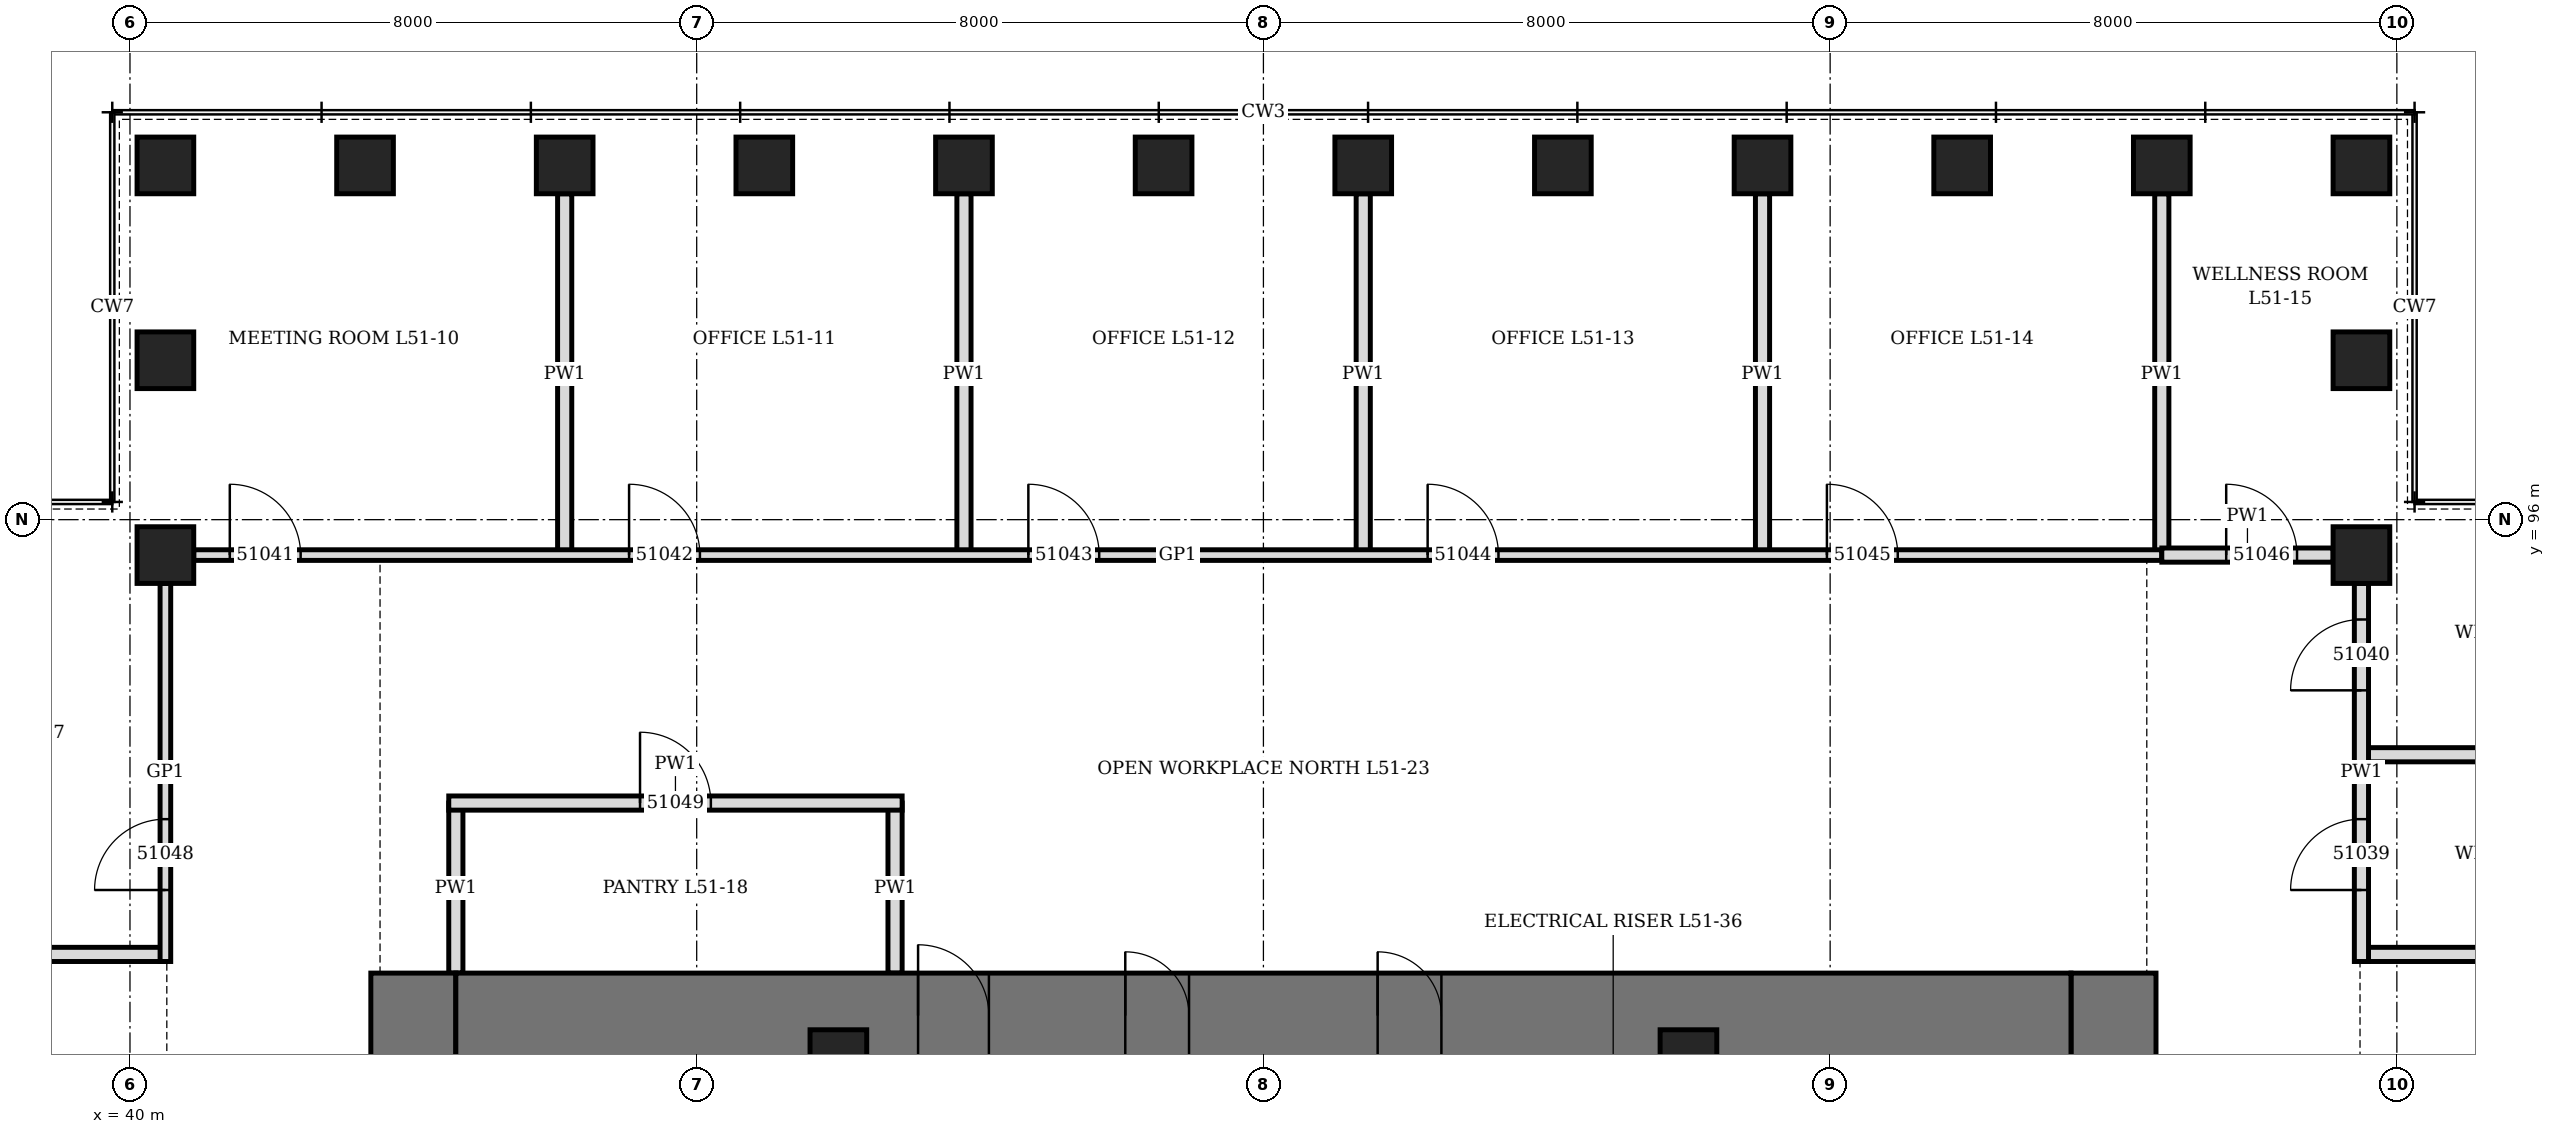
"""IFC4 building model, lengths in metres.
Left out: names, types, materials, properties, quantities, classifications, styles, units other than length and angle.
Written with IfcOpenShell. Run it as: python <this file> out.ifc"""

import sys

from ifc_helpers import new_model, si_unit, direction, frame, frame_2d, origin, origin_2d, place, context, subcontext, project, spatial, rectangle, hollow_rectangle, extrude, element, fill, save


model = new_model("IFC4")
c1 = context("Model", 3, precision=1e-05, world=origin(), true_north=direction((0.0, 1.0)))
c2 = subcontext(c1, "Body", "Model", "MODEL_VIEW")
j1 = project(units=[si_unit("LENGTHUNIT", "METRE"), si_unit("PLANEANGLEUNIT", "RADIAN")], contexts=[c1])
p1 = place(None, origin())
s1 = spatial("IfcSite", under=j1, at=p1, CompositionType="ELEMENT")
p2 = place(p1, origin())
s2 = spatial("IfcBuilding", under=s1, at=p2, CompositionType="ELEMENT")
p3 = place(p2, frame((0.0, 0.0, 227.5)))
s3 = spatial("IfcBuildingStorey", under=s2, at=p3, CompositionType="ELEMENT", Elevation=227.5)
for number, where, z_axis, x_axis in (
    (1, (71.5, 95.5, 0.0), (0.0, 0.0, 1.0), (0.0, 1.0, 0.0)),
    (2, (71.5, 98.25, 0.0), (0.0, 0.0, 1.0), (0.0, 1.0, 0.0)),
    (3, (71.5, 101.0, 0.0), (0.0, 0.0, 1.0), (1.0, 0.0, 0.0)),
    (4, (68.682, 101.0, 0.0), (0.0, 0.0, 1.0), (1.0, 0.0, 0.0)),
    (5, (65.864, 101.0, 0.0), (0.0, 0.0, 1.0), (1.0, 0.0, 0.0)),
    (6, (63.045, 101.0, 0.0), (0.0, 0.0, 1.0), (1.0, 0.0, 0.0)),
    (7, (60.227, 101.0, 0.0), (0.0, 0.0, 1.0), (1.0, 0.0, 0.0)),
    (8, (57.409, 101.0, 0.0), (0.0, 0.0, 1.0), (1.0, 0.0, 0.0)),
    (9, (54.591, 101.0, 0.0), (0.0, 0.0, 1.0), (1.0, 0.0, 0.0)),
    (10, (51.773, 101.0, 0.0), (0.0, 0.0, 1.0), (1.0, 0.0, 0.0)),
    (11, (48.955, 101.0, 0.0), (0.0, 0.0, 1.0), (1.0, 0.0, 0.0)),
    (12, (46.136, 101.0, 0.0), (0.0, 0.0, 1.0), (1.0, 0.0, 0.0)),
    (13, (43.318, 101.0, 0.0), (0.0, 0.0, 1.0), (1.0, 0.0, 0.0)),
    (14, (40.5, 101.0, 0.0), (0.0, 0.0, 1.0), (0.0, 1.0, 0.0)),
    (15, (40.5, 98.25, 0.0), (0.0, 0.0, 1.0), (0.0, 1.0, 0.0)),
    (16, (40.5, 95.5, 0.0), (0.0, 0.0, 1.0), (1.0, 0.0, 0.0)),
):
    element("IfcColumn", number, at=place(p3, frame(where, z_axis=z_axis, x_axis=x_axis)), inside=s3, PredefinedType="COLUMN", context=c2, shape_type="SweptSolid", body=[
        extrude(hollow_rectangle(XDim=0.8, YDim=0.8, WallThickness=0.08, at=origin_2d()), origin(), (0.0, 0.0, 1.0), 4.2),
    ])
p4 = place(p3, frame((44.0, 70.4, 0.0), z_axis=(0.0, 0.0, 1.0), x_axis=(0.0, 1.0, 0.0)))
e17 = element("IfcWall", 17, at=p4, inside=s3, PredefinedType="SHEAR", context=c2, shape_type="SweptSolid", body=[
    extrude(rectangle(XDim=19.2, YDim=1.2, at=frame_2d((9.6, 0.0))), origin(), (0.0, 0.0, 1.0), 4.2),
])
p5 = place(p4, frame((8.6, 0.0, 0.0)))
e18 = element("IfcOpeningElement", 18, at=p5, cuts=e17, PredefinedType="OPENING", context=c2, shape_type="SweptSolid", body=[
    extrude(rectangle(XDim=2.0, YDim=2.4, at=frame_2d((1.0, 1.2))), frame((0.0, 0.61, 0.0), z_axis=(0.0, -1.0, 0.0), x_axis=(1.0, 0.0, 0.0)), (0.0, 0.0, 1.0), 1.22),
])
p6 = place(p3, frame((68.0, 70.4, 0.0), z_axis=(0.0, 0.0, 1.0), x_axis=(0.0, 1.0, 0.0)))
e19 = element("IfcWall", 19, at=p6, inside=s3, PredefinedType="SHEAR", context=c2, shape_type="SweptSolid", body=[
    extrude(rectangle(XDim=19.2, YDim=1.2, at=frame_2d((9.6, 0.0))), origin(), (0.0, 0.0, 1.0), 4.2),
])
p7 = place(p6, frame((8.6, 0.0, 0.0)))
e20 = element("IfcOpeningElement", 20, at=p7, cuts=e19, PredefinedType="OPENING", context=c2, shape_type="SweptSolid", body=[
    extrude(rectangle(XDim=2.0, YDim=2.4, at=frame_2d((1.0, 1.2))), frame((0.0, 0.61, 0.0), z_axis=(0.0, -1.0, 0.0), x_axis=(1.0, 0.0, 0.0)), (0.0, 0.0, 1.0), 1.22),
])
p8 = place(p3, frame((44.6, 89.0, 0.0), z_axis=(0.0, 0.0, 1.0), x_axis=(1.0, 0.0, 0.0)))
e21 = element("IfcWall", 21, at=p8, inside=s3, PredefinedType="SHEAR", context=c2, shape_type="SweptSolid", body=[
    extrude(rectangle(XDim=22.8, YDim=1.2, at=frame_2d((11.4, 0.0))), origin(), (0.0, 0.0, 1.0), 4.2),
])
p9 = place(p8, frame((6.525, 0.0, 0.0)))
e22 = element("IfcOpeningElement", 22, at=p9, cuts=e21, PredefinedType="OPENING", context=c2, shape_type="SweptSolid", body=[
    extrude(rectangle(XDim=1.0, YDim=2.1, at=frame_2d((0.5, 1.05))), frame((0.0, 0.61, 0.0), z_axis=(0.0, -1.0, 0.0), x_axis=(1.0, 0.0, 0.0)), (0.0, 0.0, 1.0), 1.22),
])
p10 = place(p8, frame((9.45, 0.0, 0.0)))
e23 = element("IfcOpeningElement", 23, at=p10, cuts=e21, PredefinedType="OPENING", context=c2, shape_type="SweptSolid", body=[
    extrude(rectangle(XDim=0.9, YDim=2.1, at=frame_2d((0.45, 1.05))), frame((0.0, 0.61, 0.0), z_axis=(0.0, -1.0, 0.0), x_axis=(1.0, 0.0, 0.0)), (0.0, 0.0, 1.0), 1.22),
])
p11 = place(p8, frame((13.012, 0.0, 0.0)))
e24 = element("IfcOpeningElement", 24, at=p11, cuts=e21, PredefinedType="OPENING", context=c2, shape_type="SweptSolid", body=[
    extrude(rectangle(XDim=0.9, YDim=2.1, at=frame_2d((0.45, 1.05))), frame((0.0, 0.61, 0.0), z_axis=(0.0, -1.0, 0.0), x_axis=(1.0, 0.0, 0.0)), (0.0, 0.0, 1.0), 1.22),
])
for number, where, z_axis, x_axis in (
    (25, (50.0, 88.4, 0.0), (0.0, 0.0, 1.0), (1.0, 0.0, 0.0)),
    (26, (62.0, 88.4, 0.0), (0.0, 0.0, 1.0), (1.0, 0.0, 0.0)),
):
    element("IfcColumn", number, at=place(p3, frame(where, z_axis=z_axis, x_axis=x_axis)), inside=s3, PredefinedType="COLUMN", context=c2, shape_type="SweptSolid", body=[
        extrude(hollow_rectangle(XDim=0.8, YDim=0.8, WallThickness=0.1, at=origin_2d()), origin(), (0.0, 0.0, 1.0), 4.2),
    ])
for number, where, z_axis, x_axis in (
    (27, (71.5, 89.864, 0.0), (0.0, 0.0, 1.0), (1.0, 0.0, 0.0)),
    (28, (71.5, 92.682, 0.0), (0.0, 0.0, 1.0), (1.0, 0.0, 0.0)),
    (29, (46.136, 95.5, 0.0), (0.0, 0.0, 1.0), (0.0, 1.0, 0.0)),
    (30, (51.773, 95.5, 0.0), (0.0, 0.0, 1.0), (0.0, 1.0, 0.0)),
    (31, (57.409, 95.5, 0.0), (0.0, 0.0, 1.0), (0.0, 1.0, 0.0)),
    (32, (63.045, 95.5, 0.0), (0.0, 0.0, 1.0), (0.0, 1.0, 0.0)),
    (33, (68.682, 95.5, 0.0), (0.0, 0.0, 1.0), (0.0, 1.0, 0.0)),
    (34, (35.4, 89.864, 0.0), (0.0, 0.0, 1.0), (1.0, 0.0, 0.0)),
):
    element("IfcWall", number, at=place(p3, frame(where, z_axis=z_axis, x_axis=x_axis)), inside=s3, PredefinedType="PARTITIONING", context=c2, shape_type="SweptSolid", body=[
        extrude(rectangle(XDim=5.1, YDim=0.2, at=frame_2d((2.55, 0.0))), origin(), (0.0, 0.0, 1.0), 3.428),
    ])
for number, where, z_axis, x_axis in (
    (35, (44.6, 89.6, 0.0), (0.0, 0.0, 1.0), (0.0, 1.0, 0.0)),
    (36, (50.8, 89.6, 0.0), (0.0, 0.0, 1.0), (0.0, 1.0, 0.0)),
):
    element("IfcWall", number, at=place(p3, frame(where, z_axis=z_axis, x_axis=x_axis)), inside=s3, PredefinedType="PARTITIONING", context=c2, shape_type="SweptSolid", body=[
        extrude(rectangle(XDim=2.4, YDim=0.2, at=frame_2d((1.2, 0.0))), origin(), (0.0, 0.0, 1.0), 4.04),
    ])
p12 = place(p3, frame((44.5, 92.0, 0.0), z_axis=(0.0, 0.0, 1.0), x_axis=(1.0, 0.0, 0.0)))
e37 = element("IfcWall", 37, at=p12, inside=s3, PredefinedType="PARTITIONING", context=c2, shape_type="SweptSolid", body=[
    extrude(rectangle(XDim=6.4, YDim=0.2, at=frame_2d((3.2, 0.0))), origin(), (0.0, 0.0, 1.0), 4.04),
])
p13 = place(p12, frame((2.7, 0.0, 0.0)))
e38 = element("IfcOpeningElement", 38, at=p13, cuts=e37, PredefinedType="OPENING", context=c2, shape_type="SweptSolid", body=[
    extrude(rectangle(XDim=1.0, YDim=2.1, at=frame_2d((0.5, 1.05))), frame((0.0, 0.11, 0.0), z_axis=(0.0, -1.0, 0.0), x_axis=(1.0, 0.0, 0.0)), (0.0, 0.0, 1.0), 0.22),
])
p14 = place(p3, frame((40.9, 95.5, 0.0), z_axis=(0.0, 0.0, 1.0), x_axis=(1.0, 0.0, 0.0)))
e39 = element("IfcWall", 39, at=p14, inside=s3, PredefinedType="PARTITIONING", context=c2, shape_type="SweptSolid", body=[
    extrude(rectangle(XDim=27.782, YDim=0.15, at=frame_2d((13.891, 0.0))), origin(), (0.0, 0.0, 1.0), 4.04),
])
p15 = place(p14, frame((0.509, 0.0, 0.0)))
e40 = element("IfcOpeningElement", 40, at=p15, cuts=e39, PredefinedType="OPENING", context=c2, shape_type="SweptSolid", body=[
    extrude(rectangle(XDim=1.0, YDim=2.4, at=frame_2d((0.5, 1.2))), frame((0.0, 0.085, 0.0), z_axis=(0.0, -1.0, 0.0), x_axis=(1.0, 0.0, 0.0)), (0.0, 0.0, 1.0), 0.17),
])
p16 = place(p14, frame((6.146, 0.0, 0.0)))
e41 = element("IfcOpeningElement", 41, at=p16, cuts=e39, PredefinedType="OPENING", context=c2, shape_type="SweptSolid", body=[
    extrude(rectangle(XDim=1.0, YDim=2.1, at=frame_2d((0.5, 1.05))), frame((0.0, 0.085, 0.0), z_axis=(0.0, -1.0, 0.0), x_axis=(1.0, 0.0, 0.0)), (0.0, 0.0, 1.0), 0.17),
])
p17 = place(p14, frame((11.782, 0.0, 0.0)))
e42 = element("IfcOpeningElement", 42, at=p17, cuts=e39, PredefinedType="OPENING", context=c2, shape_type="SweptSolid", body=[
    extrude(rectangle(XDim=1.0, YDim=2.1, at=frame_2d((0.5, 1.05))), frame((0.0, 0.085, 0.0), z_axis=(0.0, -1.0, 0.0), x_axis=(1.0, 0.0, 0.0)), (0.0, 0.0, 1.0), 0.17),
])
p18 = place(p14, frame((17.418, 0.0, 0.0)))
e43 = element("IfcOpeningElement", 43, at=p18, cuts=e39, PredefinedType="OPENING", context=c2, shape_type="SweptSolid", body=[
    extrude(rectangle(XDim=1.0, YDim=2.1, at=frame_2d((0.5, 1.05))), frame((0.0, 0.085, 0.0), z_axis=(0.0, -1.0, 0.0), x_axis=(1.0, 0.0, 0.0)), (0.0, 0.0, 1.0), 0.17),
])
p19 = place(p14, frame((23.054, 0.0, 0.0)))
e44 = element("IfcOpeningElement", 44, at=p19, cuts=e39, PredefinedType="OPENING", context=c2, shape_type="SweptSolid", body=[
    extrude(rectangle(XDim=1.0, YDim=2.1, at=frame_2d((0.5, 1.05))), frame((0.0, 0.085, 0.0), z_axis=(0.0, -1.0, 0.0), x_axis=(1.0, 0.0, 0.0)), (0.0, 0.0, 1.0), 0.17),
])
p20 = place(p3, frame((68.682, 95.5, 0.0), z_axis=(0.0, 0.0, 1.0), x_axis=(1.0, 0.0, 0.0)))
e45 = element("IfcWall", 45, at=p20, inside=s3, PredefinedType="PARTITIONING", context=c2, shape_type="SweptSolid", body=[
    extrude(rectangle(XDim=2.418, YDim=0.2, at=frame_2d((1.209, 0.0))), origin(), (0.0, 0.0, 1.0), 4.04),
])
p21 = place(p20, frame((0.909, 0.0, 0.0)))
e46 = element("IfcOpeningElement", 46, at=p21, cuts=e45, PredefinedType="OPENING", context=c2, shape_type="SweptSolid", body=[
    extrude(rectangle(XDim=1.0, YDim=2.1, at=frame_2d((0.5, 1.05))), frame((0.0, 0.11, 0.0), z_axis=(0.0, -1.0, 0.0), x_axis=(1.0, 0.0, 0.0)), (0.0, 0.0, 1.0), 0.22),
])
p22 = place(p3, frame((40.5, 89.764, 0.0), z_axis=(0.0, 0.0, 1.0), x_axis=(0.0, 1.0, 0.0)))
e47 = element("IfcWall", 47, at=p22, inside=s3, PredefinedType="PARTITIONING", context=c2, shape_type="SweptSolid", body=[
    extrude(rectangle(XDim=5.336, YDim=0.15, at=frame_2d((2.668, 0.0))), origin(), (0.0, 0.0, 1.0), 4.04),
])
p23 = place(p22, frame((1.009, 0.0, 0.0)))
e48 = element("IfcOpeningElement", 48, at=p23, cuts=e47, PredefinedType="OPENING", context=c2, shape_type="SweptSolid", body=[
    extrude(rectangle(XDim=1.0, YDim=2.4, at=frame_2d((0.5, 1.2))), frame((0.0, 0.085, 0.0), z_axis=(0.0, -1.0, 0.0), x_axis=(1.0, 0.0, 0.0)), (0.0, 0.0, 1.0), 0.17),
])
p24 = place(p3, frame((71.5, 89.764, 0.0), z_axis=(0.0, 0.0, 1.0), x_axis=(0.0, 1.0, 0.0)))
e49 = element("IfcWall", 49, at=p24, inside=s3, PredefinedType="PARTITIONING", context=c2, shape_type="SweptSolid", body=[
    extrude(rectangle(XDim=5.336, YDim=0.2, at=frame_2d((2.668, 0.0))), origin(), (0.0, 0.0, 1.0), 4.04),
])
p25 = place(p24, frame((1.009, 0.0, 0.0)))
e50 = element("IfcOpeningElement", 50, at=p25, cuts=e49, PredefinedType="OPENING", context=c2, shape_type="SweptSolid", body=[
    extrude(rectangle(XDim=1.0, YDim=2.1, at=frame_2d((0.5, 1.05))), frame((0.0, 0.11, 0.0), z_axis=(0.0, -1.0, 0.0), x_axis=(1.0, 0.0, 0.0)), (0.0, 0.0, 1.0), 0.22),
])
p26 = place(p24, frame((3.827, 0.0, 0.0)))
e51 = element("IfcOpeningElement", 51, at=p26, cuts=e49, PredefinedType="OPENING", context=c2, shape_type="SweptSolid", body=[
    extrude(rectangle(XDim=1.0, YDim=2.1, at=frame_2d((0.5, 1.05))), frame((0.0, 0.11, 0.0), z_axis=(0.0, -1.0, 0.0), x_axis=(1.0, 0.0, 0.0)), (0.0, 0.0, 1.0), 0.22),
])
p27 = place(p9, origin())
e52 = element("IfcDoor", 52, at=p27, inside=s3, OperationType="SINGLE_SWING_LEFT", PredefinedType="DOOR", context=c2, shape_type="SweptSolid", body=[
    extrude(rectangle(XDim=1.0, YDim=2.1, at=frame_2d((0.5, 1.05))), frame((0.0, 0.35, 0.0), z_axis=(0.0, -1.0, 0.0), x_axis=(1.0, 0.0, 0.0)), (0.0, 0.0, 1.0), 0.7),
])
fill(e22, e52)
p28 = place(p10, origin())
e53 = element("IfcDoor", 53, at=p28, inside=s3, OperationType="SINGLE_SWING_LEFT", PredefinedType="DOOR", context=c2, shape_type="SweptSolid", body=[
    extrude(rectangle(XDim=0.9, YDim=2.1, at=frame_2d((0.45, 1.05))), frame((0.0, 0.35, 0.0), z_axis=(0.0, -1.0, 0.0), x_axis=(1.0, 0.0, 0.0)), (0.0, 0.0, 1.0), 0.7),
])
fill(e23, e53)
p29 = place(p11, origin())
e54 = element("IfcDoor", 54, at=p29, inside=s3, OperationType="SINGLE_SWING_LEFT", PredefinedType="DOOR", context=c2, shape_type="SweptSolid", body=[
    extrude(rectangle(XDim=0.9, YDim=2.1, at=frame_2d((0.45, 1.05))), frame((0.0, 0.35, 0.0), z_axis=(0.0, -1.0, 0.0), x_axis=(1.0, 0.0, 0.0)), (0.0, 0.0, 1.0), 0.7),
])
fill(e24, e54)
p30 = place(p25, origin())
e55 = element("IfcDoor", 55, at=p30, inside=s3, OperationType="SINGLE_SWING_LEFT", PredefinedType="DOOR", context=c2, shape_type="SweptSolid", body=[
    extrude(rectangle(XDim=1.0, YDim=2.1, at=frame_2d((0.5, 1.05))), frame((0.0, 0.1, 0.0), z_axis=(0.0, -1.0, 0.0), x_axis=(1.0, 0.0, 0.0)), (0.0, 0.0, 1.0), 0.199),
])
fill(e50, e55)
p31 = place(p26, origin())
e56 = element("IfcDoor", 56, at=p31, inside=s3, OperationType="SINGLE_SWING_LEFT", PredefinedType="DOOR", context=c2, shape_type="SweptSolid", body=[
    extrude(rectangle(XDim=1.0, YDim=2.1, at=frame_2d((0.5, 1.05))), frame((0.0, 0.1, 0.0), z_axis=(0.0, -1.0, 0.0), x_axis=(1.0, 0.0, 0.0)), (0.0, 0.0, 1.0), 0.199),
])
fill(e51, e56)
p32 = place(p15, origin())
e57 = element("IfcDoor", 57, at=p32, inside=s3, OperationType="SINGLE_SWING_RIGHT", PredefinedType="DOOR", context=c2, shape_type="SweptSolid", body=[
    extrude(rectangle(XDim=1.0, YDim=2.4, at=frame_2d((0.5, 1.2))), frame((0.0, 0.075, 0.0), z_axis=(0.0, -1.0, 0.0), x_axis=(1.0, 0.0, 0.0)), (0.0, 0.0, 1.0), 0.149),
])
fill(e40, e57)
p33 = place(p16, origin())
e58 = element("IfcDoor", 58, at=p33, inside=s3, OperationType="SINGLE_SWING_LEFT", PredefinedType="DOOR", context=c2, shape_type="SweptSolid", body=[
    extrude(rectangle(XDim=1.0, YDim=2.1, at=frame_2d((0.5, 1.05))), frame((0.0, 0.075, 0.0), z_axis=(0.0, -1.0, 0.0), x_axis=(1.0, 0.0, 0.0)), (0.0, 0.0, 1.0), 0.149),
])
fill(e41, e58)
p34 = place(p17, origin())
e59 = element("IfcDoor", 59, at=p34, inside=s3, OperationType="SINGLE_SWING_LEFT", PredefinedType="DOOR", context=c2, shape_type="SweptSolid", body=[
    extrude(rectangle(XDim=1.0, YDim=2.1, at=frame_2d((0.5, 1.05))), frame((0.0, 0.075, 0.0), z_axis=(0.0, -1.0, 0.0), x_axis=(1.0, 0.0, 0.0)), (0.0, 0.0, 1.0), 0.149),
])
fill(e42, e59)
p35 = place(p18, origin())
e60 = element("IfcDoor", 60, at=p35, inside=s3, OperationType="SINGLE_SWING_LEFT", PredefinedType="DOOR", context=c2, shape_type="SweptSolid", body=[
    extrude(rectangle(XDim=1.0, YDim=2.1, at=frame_2d((0.5, 1.05))), frame((0.0, 0.075, 0.0), z_axis=(0.0, -1.0, 0.0), x_axis=(1.0, 0.0, 0.0)), (0.0, 0.0, 1.0), 0.149),
])
fill(e43, e60)
p36 = place(p19, origin())
e61 = element("IfcDoor", 61, at=p36, inside=s3, OperationType="SINGLE_SWING_LEFT", PredefinedType="DOOR", context=c2, shape_type="SweptSolid", body=[
    extrude(rectangle(XDim=1.0, YDim=2.1, at=frame_2d((0.5, 1.05))), frame((0.0, 0.075, 0.0), z_axis=(0.0, -1.0, 0.0), x_axis=(1.0, 0.0, 0.0)), (0.0, 0.0, 1.0), 0.149),
])
fill(e44, e61)
p37 = place(p21, origin())
e62 = element("IfcDoor", 62, at=p37, inside=s3, OperationType="SINGLE_SWING_LEFT", PredefinedType="DOOR", context=c2, shape_type="SweptSolid", body=[
    extrude(rectangle(XDim=1.0, YDim=2.1, at=frame_2d((0.5, 1.05))), frame((0.0, 0.1, 0.0), z_axis=(0.0, -1.0, 0.0), x_axis=(1.0, 0.0, 0.0)), (0.0, 0.0, 1.0), 0.199),
])
fill(e46, e62)
p38 = place(p23, origin())
e63 = element("IfcDoor", 63, at=p38, inside=s3, OperationType="SINGLE_SWING_RIGHT", PredefinedType="DOOR", context=c2, shape_type="SweptSolid", body=[
    extrude(rectangle(XDim=1.0, YDim=2.4, at=frame_2d((0.5, 1.2))), frame((0.0, 0.075, 0.0), z_axis=(0.0, -1.0, 0.0), x_axis=(1.0, 0.0, 0.0)), (0.0, 0.0, 1.0), 0.149),
])
fill(e48, e63)
p39 = place(p13, origin())
e64 = element("IfcDoor", 64, at=p39, inside=s3, OperationType="SINGLE_SWING_LEFT", PredefinedType="DOOR", context=c2, shape_type="SweptSolid", body=[
    extrude(rectangle(XDim=1.0, YDim=2.1, at=frame_2d((0.5, 1.05))), frame((0.0, 0.1, 0.0), z_axis=(0.0, -1.0, 0.0), x_axis=(1.0, 0.0, 0.0)), (0.0, 0.0, 1.0), 0.199),
])
fill(e38, e64)
save(model, sys.argv[1])
